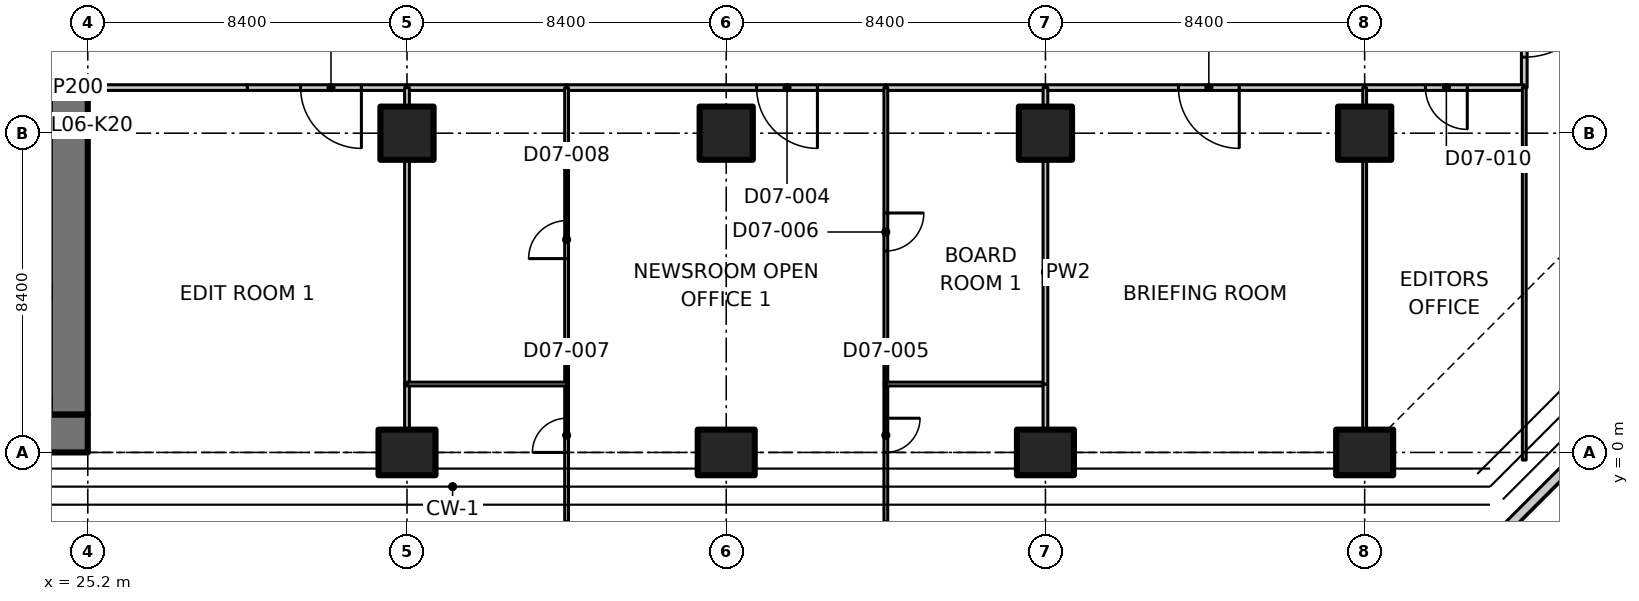
"""IFC4 building model, lengths in metres.
Left out: names, types, materials, properties, quantities, classifications, styles, units other than length and angle.
Written with IfcOpenShell. Run it as: python <this file> out.ifc"""

import sys

from ifc_helpers import new_model, si_unit, direction, frame, frame_2d, origin, origin_2d, place, context, subcontext, project, spatial, polyline, rectangle, outline, extrude, element, fill, save


model = new_model("IFC4")
c1 = context("Model", 3, precision=1e-05, world=origin(), true_north=direction((0.0, 1.0)))
c2 = subcontext(c1, "Body", "Model", "MODEL_VIEW")
j1 = project(units=[si_unit("LENGTHUNIT", "METRE"), si_unit("PLANEANGLEUNIT", "RADIAN")], contexts=[c1])
p1 = place(None, origin())
s1 = spatial("IfcSite", under=j1, at=p1, CompositionType="ELEMENT")
p2 = place(p1, origin())
s2 = spatial("IfcBuilding", under=s1, at=p2, CompositionType="ELEMENT")
p3 = place(p2, frame((0.0, 0.0, 36.5)))
s3 = spatial("IfcBuildingStorey", under=s2, at=p3, CompositionType="ELEMENT", Elevation=36.5)
p4 = place(p3, frame((33.6, 0.0, 0.0), z_axis=(0.0, 0.0, 1.0), x_axis=(0.0, 1.0, 0.0)))
e1 = element("IfcColumn", 1, at=p4, inside=s3, PredefinedType="COLUMN", context=c2, shape_type="SweptSolid", body=[
    extrude(rectangle(XDim=1.2, YDim=1.5, at=origin_2d()), origin(), (0.0, 0.0, 1.0), 3.35),
])
p5 = place(p3, frame((33.6, 8.4, 0.0), z_axis=(0.0, 0.0, 1.0), x_axis=(1.0, 0.0, 0.0)))
e2 = element("IfcColumn", 2, at=p5, inside=s3, PredefinedType="COLUMN", context=c2, shape_type="SweptSolid", body=[
    extrude(rectangle(XDim=1.4, YDim=1.4, at=origin_2d()), origin(), (0.0, 0.0, 1.0), 3.35),
])
p6 = place(p3, frame((42.0, 0.0, 0.0), z_axis=(0.0, 0.0, 1.0), x_axis=(0.0, 1.0, 0.0)))
e3 = element("IfcColumn", 3, at=p6, inside=s3, PredefinedType="COLUMN", context=c2, shape_type="SweptSolid", body=[
    extrude(rectangle(XDim=1.2, YDim=1.5, at=origin_2d()), origin(), (0.0, 0.0, 1.0), 3.35),
])
p7 = place(p3, frame((42.0, 8.4, 0.0), z_axis=(0.0, 0.0, 1.0), x_axis=(1.0, 0.0, 0.0)))
e4 = element("IfcColumn", 4, at=p7, inside=s3, PredefinedType="COLUMN", context=c2, shape_type="SweptSolid", body=[
    extrude(rectangle(XDim=1.4, YDim=1.4, at=origin_2d()), origin(), (0.0, 0.0, 1.0), 3.35),
])
p8 = place(p3, frame((50.4, 0.0, 0.0), z_axis=(0.0, 0.0, 1.0), x_axis=(0.0, 1.0, 0.0)))
e5 = element("IfcColumn", 5, at=p8, inside=s3, PredefinedType="COLUMN", context=c2, shape_type="SweptSolid", body=[
    extrude(rectangle(XDim=1.2, YDim=1.5, at=origin_2d()), origin(), (0.0, 0.0, 1.0), 3.35),
])
p9 = place(p3, frame((50.4, 8.4, 0.0), z_axis=(0.0, 0.0, 1.0), x_axis=(1.0, 0.0, 0.0)))
e6 = element("IfcColumn", 6, at=p9, inside=s3, PredefinedType="COLUMN", context=c2, shape_type="SweptSolid", body=[
    extrude(rectangle(XDim=1.4, YDim=1.4, at=origin_2d()), origin(), (0.0, 0.0, 1.0), 3.35),
])
p10 = place(p3, frame((58.8, 0.0, 0.0), z_axis=(0.0, 0.0, 1.0), x_axis=(0.0, 1.0, 0.0)))
e7 = element("IfcColumn", 7, at=p10, inside=s3, PredefinedType="COLUMN", context=c2, shape_type="SweptSolid", body=[
    extrude(rectangle(XDim=1.2, YDim=1.5, at=origin_2d()), origin(), (0.0, 0.0, 1.0), 3.35),
])
p11 = place(p3, frame((58.8, 8.4, 0.0), z_axis=(0.0, 0.0, 1.0), x_axis=(1.0, 0.0, 0.0)))
e8 = element("IfcColumn", 8, at=p11, inside=s3, PredefinedType="COLUMN", context=c2, shape_type="SweptSolid", body=[
    extrude(rectangle(XDim=1.4, YDim=1.4, at=origin_2d()), origin(), (0.0, 0.0, 1.0), 3.35),
])
p12 = place(p3, frame((64.743, 0.223, 0.0), z_axis=(0.0, 0.0, 1.0), x_axis=(-0.70706814675, -0.707145413513, 0.0)))
e9 = element("IfcWall", 9, at=p12, inside=s3, PredefinedType="PARAPET", context=c2, shape_type="SweptSolid", body=[
    extrude(rectangle(XDim=3.16, YDim=0.25, at=frame_2d((1.58, 0.0))), origin(), (0.0, 0.0, 1.0), 1.1),
])
p13 = place(p3, frame((6.936, 0.5, 0.0), z_axis=(0.0, 0.0, 1.0), x_axis=(1.0, 0.0, 0.0)))
e10 = element("IfcWall", 10, at=p13, inside=s3, PredefinedType="SHEAR", context=c2, shape_type="SweptSolid", body=[
    extrude(rectangle(XDim=18.264, YDim=1.0, at=frame_2d((9.132, 0.0))), origin(), (0.0, 0.0, 1.0), 3.35),
])
p14 = place(p3, frame((24.7, 1.0, 0.0), z_axis=(0.0, 0.0, 1.0), x_axis=(0.0, 1.0, 0.0)))
e11 = element("IfcWall", 11, at=p14, inside=s3, PredefinedType="SHEAR", context=c2, shape_type="SweptSolid", body=[
    extrude(rectangle(XDim=8.8, YDim=1.0, at=frame_2d((4.4, 0.0))), origin(), (0.0, 0.0, 1.0), 3.35),
])
p15 = place(p3, frame((29.4, 9.6, 0.0), z_axis=(0.0, 0.0, 1.0), x_axis=(-1.0, 0.0, 0.0)))
e12 = element("IfcWall", 12, at=p15, inside=s3, PredefinedType="PARTITIONING", context=c2, shape_type="SweptSolid", body=[
    extrude(rectangle(XDim=4.2, YDim=0.15, at=frame_2d((2.1, 0.0))), origin(), (0.0, 0.0, 1.0), 3.33),
])
p16 = place(p3, frame((63.0, 13.0, 0.0), z_axis=(0.0, 0.0, 1.0), x_axis=(0.0, -1.0, 0.0)))
e13 = element("IfcWall", 13, at=p16, inside=s3, PredefinedType="PARTITIONING", context=c2, shape_type="SweptSolid", body=[
    extrude(rectangle(XDim=3.4, YDim=0.15, at=frame_2d((1.7, 0.0))), origin(), (0.0, 0.0, 1.0), 3.33),
])
p17 = place(p16, frame((0.6, 0.0, 0.0)))
e14 = element("IfcOpeningElement", 14, at=p17, cuts=e13, PredefinedType="OPENING", context=c2, shape_type="SweptSolid", body=[
    extrude(rectangle(XDim=2.0, YDim=2.4, at=frame_2d((1.0, 1.2))), frame((0.0, 0.085, 0.0), z_axis=(0.0, -1.0, 0.0), x_axis=(1.0, 0.0, 0.0)), (0.0, 0.0, 1.0), 0.17),
])
p18 = place(p3, frame((33.6, 9.6, 0.0), z_axis=(0.0, 0.0, 1.0), x_axis=(-1.0, 0.0, 0.0)))
e15 = element("IfcWall", 15, at=p18, inside=s3, PredefinedType="PARTITIONING", context=c2, shape_type="SweptSolid", body=[
    extrude(rectangle(XDim=4.2, YDim=0.15, at=frame_2d((2.1, 0.0))), origin(), (0.0, 0.0, 1.0), 3.33),
])
p19 = place(p18, frame((1.2, 0.0, 0.0)))
e16 = element("IfcOpeningElement", 16, at=p19, cuts=e15, PredefinedType="OPENING", context=c2, shape_type="SweptSolid", body=[
    extrude(rectangle(XDim=1.6, YDim=2.1, at=frame_2d((0.8, 1.05))), frame((0.0, 0.085, 0.0), z_axis=(0.0, -1.0, 0.0), x_axis=(1.0, 0.0, 0.0)), (0.0, 0.0, 1.0), 0.17),
])
p20 = place(p3, frame((46.2, 9.6, 0.0), z_axis=(0.0, 0.0, 1.0), x_axis=(-1.0, 0.0, 0.0)))
e17 = element("IfcWall", 17, at=p20, inside=s3, PredefinedType="PARTITIONING", context=c2, shape_type="SweptSolid", body=[
    extrude(rectangle(XDim=8.4, YDim=0.15, at=frame_2d((4.2, 0.0))), origin(), (0.0, 0.0, 1.0), 3.33),
])
p21 = place(p20, frame((1.8, 0.0, 0.0)))
e18 = element("IfcOpeningElement", 18, at=p21, cuts=e17, PredefinedType="OPENING", context=c2, shape_type="SweptSolid", body=[
    extrude(rectangle(XDim=1.6, YDim=2.1, at=frame_2d((0.8, 1.05))), frame((0.0, 0.085, 0.0), z_axis=(0.0, -1.0, 0.0), x_axis=(1.0, 0.0, 0.0)), (0.0, 0.0, 1.0), 0.17),
])
for number, where, z_axis, x_axis in (
    (19, (50.4, 9.6, 0.0), (0.0, 0.0, 1.0), (-1.0, 0.0, 0.0)),
    (20, (37.8, 9.6, 0.0), (0.0, 0.0, 1.0), (-1.0, 0.0, 0.0)),
):
    element("IfcWall", number, at=place(p3, frame(where, z_axis=z_axis, x_axis=x_axis)), inside=s3, PredefinedType="PARTITIONING", context=c2, shape_type="SweptSolid", body=[
        extrude(rectangle(XDim=4.2, YDim=0.15, at=frame_2d((2.1, 0.0))), origin(), (0.0, 0.0, 1.0), 3.33),
    ])
p22 = place(p3, frame((58.8, 9.6, 0.0), z_axis=(0.0, 0.0, 1.0), x_axis=(-1.0, 0.0, 0.0)))
e21 = element("IfcWall", 21, at=p22, inside=s3, PredefinedType="PARTITIONING", context=c2, shape_type="SweptSolid", body=[
    extrude(rectangle(XDim=8.4, YDim=0.15, at=frame_2d((4.2, 0.0))), origin(), (0.0, 0.0, 1.0), 3.33),
])
p23 = place(p22, frame((3.3, 0.0, 0.0)))
e22 = element("IfcOpeningElement", 22, at=p23, cuts=e21, PredefinedType="OPENING", context=c2, shape_type="SweptSolid", body=[
    extrude(rectangle(XDim=1.6, YDim=2.1, at=frame_2d((0.8, 1.05))), frame((0.0, 0.085, 0.0), z_axis=(0.0, -1.0, 0.0), x_axis=(1.0, 0.0, 0.0)), (0.0, 0.0, 1.0), 0.17),
])
p24 = place(p3, frame((63.0, 9.6, 0.0), z_axis=(0.0, 0.0, 1.0), x_axis=(-1.0, 0.0, 0.0)))
e23 = element("IfcWall", 23, at=p24, inside=s3, PredefinedType="PARTITIONING", context=c2, shape_type="SweptSolid", body=[
    extrude(rectangle(XDim=4.2, YDim=0.15, at=frame_2d((2.1, 0.0))), origin(), (0.0, 0.0, 1.0), 3.33),
])
p25 = place(p24, frame((1.5, 0.0, 0.0)))
e24 = element("IfcOpeningElement", 24, at=p25, cuts=e23, PredefinedType="OPENING", context=c2, shape_type="SweptSolid", body=[
    extrude(rectangle(XDim=1.1, YDim=2.1, at=frame_2d((0.55, 1.05))), frame((0.0, 0.085, 0.0), z_axis=(0.0, -1.0, 0.0), x_axis=(1.0, 0.0, 0.0)), (0.0, 0.0, 1.0), 0.17),
])
p26 = place(p3, frame((63.0, -0.2, 0.0), z_axis=(0.0, 0.0, 1.0), x_axis=(0.0, 1.0, 0.0)))
e25 = element("IfcWall", 25, at=p26, inside=s3, PredefinedType="PARTITIONING", context=c2, shape_type="SweptSolid", body=[
    extrude(outline(polyline([(0.0, 0.0), (9.8, 0.0), (9.8, 3.33), (5.066, 3.33), (5.064, 2.98), (3.736, 2.98), (3.734, 3.33), (0.0, 3.33), (0.0, 0.0)])), frame((0.0, 0.05, 0.0), z_axis=(0.0, -1.0, 0.0), x_axis=(1.0, 0.0, 0.0)), (0.0, 0.0, 1.0), 0.1),
])
p27 = place(p3, frame((33.6, 1.8, 0.0), z_axis=(0.0, 0.0, 1.0), x_axis=(0.0, -1.0, 0.0)))
e26 = element("IfcWall", 26, at=p27, inside=s3, PredefinedType="PARTITIONING", context=c2, shape_type="SweptSolid", body=[
    extrude(rectangle(XDim=1.18, YDim=0.125, at=frame_2d((0.59, 0.0))), origin(), (0.0, 0.0, 1.0), 3.33),
])
p28 = place(p3, frame((33.6, 9.6, 0.0), z_axis=(0.0, 0.0, 1.0), x_axis=(0.0, -1.0, 0.0)))
e27 = element("IfcWall", 27, at=p28, inside=s3, PredefinedType="PARTITIONING", context=c2, shape_type="SweptSolid", body=[
    extrude(rectangle(XDim=0.48, YDim=0.125, at=frame_2d((0.24, 0.0))), origin(), (0.0, 0.0, 1.0), 3.33),
])
p29 = place(p3, frame((33.6, 7.68, 0.0), z_axis=(0.0, 0.0, 1.0), x_axis=(0.0, -1.0, 0.0)))
e28 = element("IfcWall", 28, at=p29, inside=s3, PredefinedType="PARTITIONING", context=c2, shape_type="SweptSolid", body=[
    extrude(rectangle(XDim=5.88, YDim=0.125, at=frame_2d((2.94, 0.0))), origin(), (0.0, 0.0, 1.0), 3.33),
])
p30 = place(p3, frame((46.2, 1.8, 0.0), z_axis=(0.0, 0.0, 1.0), x_axis=(0.0, -1.0, 0.0)))
e29 = element("IfcWall", 29, at=p30, inside=s3, PredefinedType="PARTITIONING", context=c2, shape_type="SweptSolid", body=[
    extrude(rectangle(XDim=3.62, YDim=0.1, at=frame_2d((1.81, 0.0))), origin(), (0.0, 0.0, 1.0), 2.98),
])
p31 = place(p30, frame((0.9, 0.0, 0.0)))
e30 = element("IfcOpeningElement", 30, at=p31, cuts=e29, PredefinedType="OPENING", context=c2, shape_type="SweptSolid", body=[
    extrude(rectangle(XDim=0.9, YDim=2.1, at=frame_2d((0.45, 1.05))), frame((0.0, 0.06, 0.0), z_axis=(0.0, -1.0, 0.0), x_axis=(1.0, 0.0, 0.0)), (0.0, 0.0, 1.0), 0.12),
])
p32 = place(p3, frame((46.2, 9.6, 0.0), z_axis=(0.0, 0.0, 1.0), x_axis=(0.0, -1.0, 0.0)))
e31 = element("IfcWall", 31, at=p32, inside=s3, PredefinedType="PARTITIONING", context=c2, shape_type="SweptSolid", body=[
    extrude(rectangle(XDim=7.8, YDim=0.1, at=frame_2d((3.9, 0.0))), origin(), (0.0, 0.0, 1.0), 3.33),
])
p33 = place(p32, frame((3.3, 0.0, 0.0)))
e32 = element("IfcOpeningElement", 32, at=p33, cuts=e31, PredefinedType="OPENING", context=c2, shape_type="SweptSolid", body=[
    extrude(rectangle(XDim=1.0, YDim=2.1, at=frame_2d((0.5, 1.05))), frame((0.0, 0.06, 0.0), z_axis=(0.0, -1.0, 0.0), x_axis=(1.0, 0.0, 0.0)), (0.0, 0.0, 1.0), 0.12),
])
p34 = place(p3, frame((37.8, -1.82, 0.0), z_axis=(0.0, 0.0, 1.0), x_axis=(0.0, 1.0, 0.0)))
e33 = element("IfcWall", 33, at=p34, inside=s3, PredefinedType="PARTITIONING", context=c2, shape_type="SweptSolid", body=[
    extrude(rectangle(XDim=3.62, YDim=0.1, at=frame_2d((1.81, 0.0))), origin(), (0.0, 0.0, 1.0), 2.98),
])
p35 = place(p34, frame((1.82, 0.0, 0.0)))
e34 = element("IfcOpeningElement", 34, at=p35, cuts=e33, PredefinedType="OPENING", context=c2, shape_type="SweptSolid", body=[
    extrude(rectangle(XDim=0.9, YDim=2.1, at=frame_2d((0.45, 1.05))), frame((0.0, 0.06, 0.0), z_axis=(0.0, -1.0, 0.0), x_axis=(1.0, 0.0, 0.0)), (0.0, 0.0, 1.0), 0.12),
])
p36 = place(p3, frame((37.8, 1.8, 0.0), z_axis=(0.0, 0.0, 1.0), x_axis=(0.0, 1.0, 0.0)))
e35 = element("IfcWall", 35, at=p36, inside=s3, PredefinedType="PARTITIONING", context=c2, shape_type="SweptSolid", body=[
    extrude(rectangle(XDim=7.8, YDim=0.1, at=frame_2d((3.9, 0.0))), origin(), (0.0, 0.0, 1.0), 3.33),
])
p37 = place(p36, frame((3.3, 0.0, 0.0)))
e36 = element("IfcOpeningElement", 36, at=p37, cuts=e35, PredefinedType="OPENING", context=c2, shape_type="SweptSolid", body=[
    extrude(rectangle(XDim=1.0, YDim=2.1, at=frame_2d((0.5, 1.05))), frame((0.0, 0.06, 0.0), z_axis=(0.0, -1.0, 0.0), x_axis=(1.0, 0.0, 0.0)), (0.0, 0.0, 1.0), 0.12),
])
p38 = place(p3, frame((46.2, 1.8, 0.0), z_axis=(0.0, 0.0, 1.0), x_axis=(1.0, 0.0, 0.0)))
e37 = element("IfcWall", 37, at=p38, inside=s3, PredefinedType="PARTITIONING", context=c2, shape_type="SweptSolid", body=[
    extrude(rectangle(XDim=4.2, YDim=0.1, at=frame_2d((2.1, 0.0))), origin(), (0.0, 0.0, 1.0), 3.33),
])
p39 = place(p3, frame((50.4, 1.8, 0.0), z_axis=(0.0, 0.0, 1.0), x_axis=(0.0, -1.0, 0.0)))
e38 = element("IfcWall", 38, at=p39, inside=s3, PredefinedType="PARTITIONING", context=c2, shape_type="SweptSolid", body=[
    extrude(rectangle(XDim=1.18, YDim=0.125, at=frame_2d((0.59, 0.0))), origin(), (0.0, 0.0, 1.0), 3.33),
])
p40 = place(p3, frame((50.4, 9.6, 0.0), z_axis=(0.0, 0.0, 1.0), x_axis=(0.0, -1.0, 0.0)))
e39 = element("IfcWall", 39, at=p40, inside=s3, PredefinedType="PARTITIONING", context=c2, shape_type="SweptSolid", body=[
    extrude(rectangle(XDim=0.48, YDim=0.125, at=frame_2d((0.24, 0.0))), origin(), (0.0, 0.0, 1.0), 3.33),
])
p41 = place(p3, frame((50.4, 7.68, 0.0), z_axis=(0.0, 0.0, 1.0), x_axis=(0.0, -1.0, 0.0)))
e40 = element("IfcWall", 40, at=p41, inside=s3, PredefinedType="PARTITIONING", context=c2, shape_type="SweptSolid", body=[
    extrude(rectangle(XDim=5.88, YDim=0.125, at=frame_2d((2.94, 0.0))), origin(), (0.0, 0.0, 1.0), 3.33),
])
p42 = place(p3, frame((33.6, 1.8, 0.0), z_axis=(0.0, 0.0, 1.0), x_axis=(1.0, 0.0, 0.0)))
e41 = element("IfcWall", 41, at=p42, inside=s3, PredefinedType="PARTITIONING", context=c2, shape_type="SweptSolid", body=[
    extrude(rectangle(XDim=4.2, YDim=0.1, at=frame_2d((2.1, 0.0))), origin(), (0.0, 0.0, 1.0), 3.33),
])
p43 = place(p3, frame((58.8, 9.6, 0.0), z_axis=(0.0, 0.0, 1.0), x_axis=(0.0, -1.0, 0.0)))
e42 = element("IfcWall", 42, at=p43, inside=s3, PredefinedType="PARTITIONING", context=c2, shape_type="SweptSolid", body=[
    extrude(rectangle(XDim=0.48, YDim=0.1, at=frame_2d((0.24, 0.0))), origin(), (0.0, 0.0, 1.0), 3.33),
])
p44 = place(p3, frame((58.8, 7.68, 0.0), z_axis=(0.0, 0.0, 1.0), x_axis=(0.0, -1.0, 0.0)))
e43 = element("IfcWall", 43, at=p44, inside=s3, PredefinedType="PARTITIONING", context=c2, shape_type="SweptSolid", body=[
    extrude(rectangle(XDim=7.06, YDim=0.1, at=frame_2d((3.53, 0.0))), origin(), (0.0, 0.0, 1.0), 3.33),
])
p45 = place(p17, origin())
e44 = element("IfcDoor", 44, at=p45, inside=s3, OperationType="DOUBLE_DOOR_SINGLE_SWING", PredefinedType="DOOR", context=c2, shape_type="SweptSolid", body=[
    extrude(rectangle(XDim=2.0, YDim=2.4, at=frame_2d((1.0, 1.2))), frame((0.0, 0.025, 0.0), z_axis=(0.0, -1.0, 0.0), x_axis=(1.0, 0.0, 0.0)), (0.0, 0.0, 1.0), 0.05),
])
fill(e14, e44)
p46 = place(p19, origin())
e45 = element("IfcDoor", 45, at=p46, inside=s3, OperationType="DOUBLE_DOOR_SINGLE_SWING", PredefinedType="DOOR", context=c2, shape_type="SweptSolid", body=[
    extrude(rectangle(XDim=1.6, YDim=2.1, at=frame_2d((0.8, 1.05))), frame((0.0, 0.025, 0.0), z_axis=(0.0, -1.0, 0.0), x_axis=(1.0, 0.0, 0.0)), (0.0, 0.0, 1.0), 0.05),
])
fill(e16, e45)
p47 = place(p21, origin())
e46 = element("IfcDoor", 46, at=p47, inside=s3, OperationType="DOUBLE_DOOR_SINGLE_SWING", PredefinedType="DOOR", context=c2, shape_type="SweptSolid", body=[
    extrude(rectangle(XDim=1.6, YDim=2.1, at=frame_2d((0.8, 1.05))), frame((0.0, 0.025, 0.0), z_axis=(0.0, -1.0, 0.0), x_axis=(1.0, 0.0, 0.0)), (0.0, 0.0, 1.0), 0.05),
])
fill(e18, e46)
p48 = place(p31, origin())
e47 = element("IfcDoor", 47, at=p48, inside=s3, OperationType="SINGLE_SWING_LEFT", PredefinedType="DOOR", context=c2, shape_type="SweptSolid", body=[
    extrude(rectangle(XDim=0.9, YDim=2.1, at=frame_2d((0.45, 1.05))), frame((0.0, 0.025, 0.0), z_axis=(0.0, -1.0, 0.0), x_axis=(1.0, 0.0, 0.0)), (0.0, 0.0, 1.0), 0.05),
])
fill(e30, e47)
p49 = place(p33, origin())
e48 = element("IfcDoor", 48, at=p49, inside=s3, OperationType="SINGLE_SWING_LEFT", PredefinedType="DOOR", context=c2, shape_type="SweptSolid", body=[
    extrude(rectangle(XDim=1.0, YDim=2.1, at=frame_2d((0.5, 1.05))), frame((0.0, 0.025, 0.0), z_axis=(0.0, -1.0, 0.0), x_axis=(1.0, 0.0, 0.0)), (0.0, 0.0, 1.0), 0.05),
])
fill(e32, e48)
p50 = place(p35, origin())
e49 = element("IfcDoor", 49, at=p50, inside=s3, OperationType="SINGLE_SWING_LEFT", PredefinedType="DOOR", context=c2, shape_type="SweptSolid", body=[
    extrude(rectangle(XDim=0.9, YDim=2.1, at=frame_2d((0.45, 1.05))), frame((0.0, 0.025, 0.0), z_axis=(0.0, -1.0, 0.0), x_axis=(1.0, 0.0, 0.0)), (0.0, 0.0, 1.0), 0.05),
])
fill(e34, e49)
p51 = place(p37, origin())
e50 = element("IfcDoor", 50, at=p51, inside=s3, OperationType="SINGLE_SWING_LEFT", PredefinedType="DOOR", context=c2, shape_type="SweptSolid", body=[
    extrude(rectangle(XDim=1.0, YDim=2.1, at=frame_2d((0.5, 1.05))), frame((0.0, 0.025, 0.0), z_axis=(0.0, -1.0, 0.0), x_axis=(1.0, 0.0, 0.0)), (0.0, 0.0, 1.0), 0.05),
])
fill(e36, e50)
p52 = place(p23, origin())
e51 = element("IfcDoor", 51, at=p52, inside=s3, OperationType="DOUBLE_DOOR_SINGLE_SWING", PredefinedType="DOOR", context=c2, shape_type="SweptSolid", body=[
    extrude(rectangle(XDim=1.6, YDim=2.1, at=frame_2d((0.8, 1.05))), frame((0.0, 0.025, 0.0), z_axis=(0.0, -1.0, 0.0), x_axis=(1.0, 0.0, 0.0)), (0.0, 0.0, 1.0), 0.05),
])
fill(e22, e51)
p53 = place(p25, origin())
e52 = element("IfcDoor", 52, at=p53, inside=s3, OperationType="SINGLE_SWING_LEFT", PredefinedType="DOOR", context=c2, shape_type="SweptSolid", body=[
    extrude(rectangle(XDim=1.1, YDim=2.1, at=frame_2d((0.55, 1.05))), frame((0.0, 0.025, 0.0), z_axis=(0.0, -1.0, 0.0), x_axis=(1.0, 0.0, 0.0)), (0.0, 0.0, 1.0), 0.05),
])
fill(e24, e52)
save(model, sys.argv[1])
